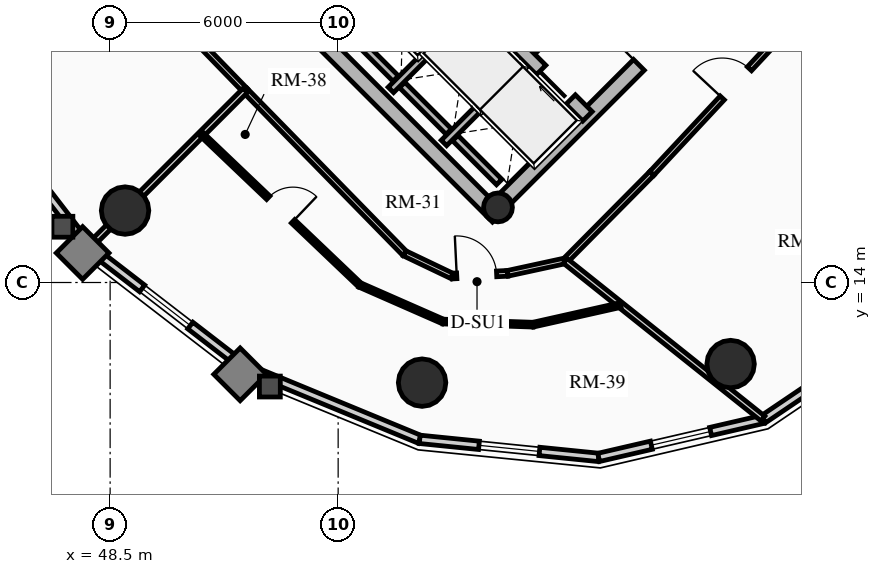
"""IFC4 building model, lengths in metres.
Left out: names, types, materials, properties, quantities, classifications, styles, units other than length and angle.
Written with IfcOpenShell. Run it as: python <this file> out.ifc"""

import sys

from ifc_helpers import new_model, si_unit, direction, frame, frame_2d, origin, origin_2d, place, context, subcontext, project, spatial, rectangle, circle, hollow_circle, extrude, source, transform, mapped, element, fill, save


model = new_model("IFC4")
c1 = context("Model", 3, precision=1e-05, world=origin(), true_north=direction((0.0, 1.0)))
c2 = subcontext(c1, "Body", "Model", "MODEL_VIEW")
j1 = project(units=[si_unit("LENGTHUNIT", "METRE"), si_unit("PLANEANGLEUNIT", "RADIAN")], contexts=[c1])
p1 = place(None, origin())
s1 = spatial("IfcSite", under=j1, at=p1, CompositionType="ELEMENT")
p2 = place(p1, origin())
s2 = spatial("IfcBuilding", under=s1, at=p2, CompositionType="ELEMENT")
p3 = place(p2, frame((0.0, 0.0, 169.06)))
s3 = spatial("IfcBuildingStorey", under=s2, at=p3, CompositionType="ELEMENT", Elevation=169.06)
p4 = place(p3, frame((58.702, 15.732, 0.0), z_axis=(0.0, 0.0, 1.0), x_axis=(-0.707106781187, 0.707106781187, 0.0)))
e1 = element("IfcWall", 1, at=p4, inside=s3, PredefinedType="SHEAR", context=c2, shape_type="SweptSolid", body=[
    extrude(rectangle(XDim=14.1, YDim=0.4, at=frame_2d((7.05, 0.0))), origin(), (0.0, 0.0, 1.0), 2.91),
])
p5 = place(p3, frame((58.561, 15.873, 0.0), z_axis=(0.0, 0.0, 1.0), x_axis=(0.707106781187, 0.707106781187, 0.0)))
e2 = element("IfcWall", 2, at=p5, inside=s3, PredefinedType="SHEAR", context=c2, shape_type="SweptSolid", body=[
    extrude(rectangle(XDim=10.7, YDim=0.4, at=frame_2d((5.35, 0.0))), origin(), (0.0, 0.0, 1.0), 2.91),
])
m1 = source(origin(), c2, "Body", "SweptSolid", [
    extrude(rectangle(XDim=1.5, YDim=2.02, at=frame_2d((0.75, 1.01))), frame((0.0, 0.21, 0.0), z_axis=(0.0, -1.0, 0.0), x_axis=(1.0, 0.0, 0.0)), (0.0, 0.0, 1.0), 0.42),
])
p6 = place(p5, frame((5.45, 0.0, 0.0)))
e3 = element("IfcOpeningElement", 3, at=p6, cuts=e2, PredefinedType="OPENING", context=c2, shape_type="MappedRepresentation", body=[
    mapped(m1, transform((0.0, 0.0, 0.0), x_axis=(1.0, 0.0, 0.0), y_axis=(0.0, 1.0, 0.0), z_axis=(0.0, 0.0, 1.0), scale=1.0)),
])
p7 = place(p3, frame((61.06, 18.373, 0.0), z_axis=(0.0, 0.0, 1.0), x_axis=(-0.707106781187, 0.707106781187, 0.0)))
e4 = element("IfcWall", 4, at=p7, inside=s3, PredefinedType="SHEAR", context=c2, shape_type="SweptSolid", body=[
    extrude(rectangle(XDim=13.7, YDim=0.35, at=frame_2d((6.85, 0.0))), origin(), (0.0, 0.0, 1.0), 2.91),
])
m2 = source(origin(), c2, "Body", "SweptSolid", [
    extrude(rectangle(XDim=1.1, YDim=2.015, at=frame_2d((0.55, 1.007))), frame((0.0, 0.185, 0.0), z_axis=(0.0, -1.0, 0.0), x_axis=(1.0, 0.0, 0.0)), (0.0, 0.0, 1.0), 0.37),
])
p8 = place(p7, frame((4.85, 0.0, 0.0)))
e5 = element("IfcOpeningElement", 5, at=p8, cuts=e4, PredefinedType="OPENING", context=c2, shape_type="MappedRepresentation", body=[
    mapped(m2, transform((0.0, 0.0, 0.0), x_axis=(1.0, 0.0, 0.0), y_axis=(0.0, 1.0, 0.0), z_axis=(0.0, 0.0, 1.0), scale=1.0)),
])
p9 = place(p7, frame((0.625, 0.0, 0.0)))
e6 = element("IfcOpeningElement", 6, at=p9, cuts=e4, PredefinedType="OPENING", context=c2, shape_type="MappedRepresentation", body=[
    mapped(m2, transform((0.0, 0.0, 0.0), x_axis=(1.0, 0.0, 0.0), y_axis=(0.0, 1.0, 0.0), z_axis=(0.0, 0.0, 1.0), scale=1.0)),
])
p10 = place(p7, frame((2.625, 0.0, 0.0)))
e7 = element("IfcOpeningElement", 7, at=p10, cuts=e4, PredefinedType="OPENING", context=c2, shape_type="MappedRepresentation", body=[
    mapped(m2, transform((0.0, 0.0, 0.0), x_axis=(1.0, 0.0, 0.0), y_axis=(0.0, 1.0, 0.0), z_axis=(0.0, 0.0, 1.0), scale=1.0)),
])
m3 = source(origin(), c2, "Body", "SweptSolid", [
    extrude(rectangle(XDim=1.15, YDim=2.02, at=frame_2d((0.575, 1.01))), frame((0.0, 0.185, 0.0), z_axis=(0.0, -1.0, 0.0), x_axis=(1.0, 0.0, 0.0)), (0.0, 0.0, 1.0), 0.37),
])
p11 = place(p7, frame((7.27, 0.0, 0.0)))
e8 = element("IfcOpeningElement", 8, at=p11, cuts=e4, PredefinedType="OPENING", context=c2, shape_type="MappedRepresentation", body=[
    mapped(m3, transform((0.0, 0.0, 0.0), x_axis=(1.0, 0.0, 0.0), y_axis=(0.0, 1.0, 0.0), z_axis=(0.0, 0.0, 1.0), scale=1.0)),
])
p12 = place(p3, frame((58.706, 15.976, 0.0), z_axis=(0.0, 0.0, 1.0), x_axis=(0.707106781187, 0.707106781187, 0.0)))
e9 = element("IfcColumn", 9, at=p12, inside=s3, PredefinedType="COLUMN", context=c2, shape_type="SweptSolid", body=[
    extrude(hollow_circle(Radius=0.38, WallThickness=0.032, at=origin_2d()), origin(), (0.0, 0.0, 1.0), 2.91),
])
for number, where, z_axis, x_axis in (
    (10, (48.893, 15.893, 0.0), (0.0, 0.0, 1.0), (1.0, 0.0, 0.0)),
    (11, (56.709, 11.365, 0.0), (0.0, 0.0, 1.0), (1.0, 0.0, 0.0)),
    (12, (64.827, 11.854, 0.0), (0.0, 0.0, 1.0), (1.0, 0.0, 0.0)),
):
    element("IfcColumn", number, at=place(p3, frame(where, z_axis=z_axis, x_axis=x_axis)), inside=s3, PredefinedType="USERDEFINED", context=c2, shape_type="SweptSolid", body=[
        extrude(circle(Radius=0.625, at=origin_2d()), origin(), (0.0, 0.0, 1.0), 2.91),
    ])
p13 = place(p3, frame((47.932, 14.932, 0.0), z_axis=(0.0, 0.0, 1.0), x_axis=(-0.610569654715, 0.791962560189, 0.0)))
e13 = element("IfcWall", 13, at=p13, inside=s3, PredefinedType="SOLIDWALL", context=c2, shape_type="SweptSolid", body=[
    extrude(rectangle(XDim=5.163, YDim=0.22, at=frame_2d((2.582, 0.0))), origin(), (0.0, 0.0, 1.0), 2.245),
])
p14 = place(p3, frame((52.021, 11.78, 0.0), z_axis=(0.0, 0.0, 1.0), x_axis=(-0.791962560189, 0.610569654715, 0.0)))
e14 = element("IfcWall", 14, at=p14, inside=s3, PredefinedType="SOLIDWALL", context=c2, shape_type="SweptSolid", body=[
    extrude(rectangle(XDim=5.163, YDim=0.22, at=frame_2d((2.582, 0.0))), origin(), (0.0, 0.0, 1.0), 2.245),
])
m4 = source(origin(), c2, "Body", "SweptSolid", [
    extrude(rectangle(XDim=1.6, YDim=1.3, at=frame_2d((0.8, 0.65))), frame((0.0, 0.12, 0.0), z_axis=(0.0, -1.0, 0.0), x_axis=(1.0, 0.0, 0.0)), (0.0, 0.0, 1.0), 0.24),
])
p15 = place(p14, frame((1.782, 0.0, 0.65)))
e15 = element("IfcOpeningElement", 15, at=p15, cuts=e14, PredefinedType="OPENING", context=c2, shape_type="MappedRepresentation", body=[
    mapped(m4, transform((0.0, 0.0, 0.0), x_axis=(1.0, 0.0, 0.0), y_axis=(0.0, 1.0, 0.0), z_axis=(0.0, 0.0, 1.0), scale=1.0)),
])
p16 = place(p3, frame((56.646, 9.873, 0.0), z_axis=(0.0, 0.0, 1.0), x_axis=(-0.924494066201, 0.381196434348, 0.0)))
e16 = element("IfcWall", 16, at=p16, inside=s3, PredefinedType="SOLIDWALL", context=c2, shape_type="SweptSolid", body=[
    extrude(rectangle(XDim=5.003, YDim=0.22, at=frame_2d((2.501, 0.0))), origin(), (0.0, 0.0, 1.0), 2.245),
])
p17 = place(p3, frame((61.355, 9.397, 0.0), z_axis=(0.0, 0.0, 1.0), x_axis=(-0.994943283129, 0.100438356004, 0.0)))
e17 = element("IfcWall", 17, at=p17, inside=s3, PredefinedType="SOLIDWALL", context=c2, shape_type="SweptSolid", body=[
    extrude(rectangle(XDim=4.733, YDim=0.22, at=frame_2d((2.366, 0.0))), origin(), (0.0, 0.0, 1.0), 2.245),
])
p18 = place(p17, frame((1.566, 0.0, 0.65)))
e18 = element("IfcOpeningElement", 18, at=p18, cuts=e17, PredefinedType="OPENING", context=c2, shape_type="MappedRepresentation", body=[
    mapped(m4, transform((0.0, 0.0, 0.0), x_axis=(1.0, 0.0, 0.0), y_axis=(0.0, 1.0, 0.0), z_axis=(0.0, 0.0, 1.0), scale=1.0)),
])
p19 = place(p3, frame((65.687, 10.4, 0.0), z_axis=(0.0, 0.0, 1.0), x_axis=(-0.97422620202, -0.22557328587, 0.0)))
e19 = element("IfcWall", 19, at=p19, inside=s3, PredefinedType="SOLIDWALL", context=c2, shape_type="SweptSolid", body=[
    extrude(rectangle(XDim=4.446, YDim=0.22, at=frame_2d((2.223, 0.0))), origin(), (0.0, 0.0, 1.0), 2.245),
])
p20 = place(p19, frame((1.423, 0.0, 0.65)))
e20 = element("IfcOpeningElement", 20, at=p20, cuts=e19, PredefinedType="OPENING", context=c2, shape_type="MappedRepresentation", body=[
    mapped(m4, transform((0.0, 0.0, 0.0), x_axis=(1.0, 0.0, 0.0), y_axis=(0.0, 1.0, 0.0), z_axis=(0.0, 0.0, 1.0), scale=1.0)),
])
p21 = place(p3, frame((69.217, 12.783, 0.0), z_axis=(0.0, 0.0, 1.0), x_axis=(-0.828817439852, -0.55951912514, 0.0)))
e21 = element("IfcWall", 21, at=p21, inside=s3, PredefinedType="SOLIDWALL", context=c2, shape_type="SweptSolid", body=[
    extrude(rectangle(XDim=4.259, YDim=0.22, at=frame_2d((2.129, 0.0))), origin(), (0.0, 0.0, 1.0), 2.245),
])
p22 = place(p3, frame((55.888, 19.069, 0.0), z_axis=(0.0, 0.0, 1.0), x_axis=(0.707106781187, 0.707106781187, 0.0)))
e22 = element("IfcWall", 22, at=p22, inside=s3, PredefinedType="SHEAR", context=c2, shape_type="SweptSolid", body=[
    extrude(rectangle(XDim=2.97, YDim=0.2, at=frame_2d((1.485, 0.0))), origin(), (0.0, 0.0, 1.0), 2.91),
])
p23 = place(p3, frame((56.015, 19.366, 0.0), z_axis=(0.0, 0.0, 1.0), x_axis=(-0.707106781187, 0.707106781187, 0.0)))
e23 = element("IfcWall", 23, at=p23, inside=s3, PredefinedType="SHEAR", context=c2, shape_type="SweptSolid", body=[
    extrude(rectangle(XDim=2.44, YDim=0.2, at=frame_2d((1.22, 0.0))), origin(), (0.0, 0.0, 1.0), 2.91),
])
p24 = place(p3, frame((57.284, 17.673, 0.0), z_axis=(0.0, 0.0, 1.0), x_axis=(0.707147878904, 0.70706568108, 0.0)))
e24 = element("IfcWall", 24, at=p24, inside=s3, PredefinedType="SHEAR", context=c2, shape_type="SweptSolid", body=[
    extrude(rectangle(XDim=2.97, YDim=0.2, at=frame_2d((1.485, 0.0))), origin(), (0.0, 0.0, 1.0), 2.91),
])
p25 = place(p3, frame((57.412, 17.97, 0.0), z_axis=(0.0, 0.0, 1.0), x_axis=(-0.707106781187, 0.707106781187, 0.0)))
e25 = element("IfcWall", 25, at=p25, inside=s3, PredefinedType="SHEAR", context=c2, shape_type="SweptSolid", body=[
    extrude(rectangle(XDim=1.735, YDim=0.2, at=frame_2d((0.867, 0.0))), origin(), (0.0, 0.0, 1.0), 2.91),
])
p26 = place(p3, frame((58.737, 16.644, 0.0), z_axis=(0.0, 0.0, 1.0), x_axis=(-0.707032117043, 0.707181437447, 0.0)))
e26 = element("IfcWall", 26, at=p26, inside=s3, PredefinedType="SHEAR", context=c2, shape_type="SweptSolid", body=[
    extrude(rectangle(XDim=1.635, YDim=0.2, at=frame_2d((0.817, 0.0))), origin(), (0.0, 0.0, 1.0), 2.91),
])
p27 = place(p3, frame((59.643, 20.066, 0.0), z_axis=(0.0, 0.0, 1.0), x_axis=(0.707106781187, 0.707106781187, 0.0)))
e27 = element("IfcWall", 27, at=p27, inside=s3, PredefinedType="PARTITIONING", context=c2, shape_type="SweptSolid", body=[
    extrude(rectangle(XDim=1.1, YDim=0.125, at=frame_2d((0.55, 0.0))), origin(), (0.0, 0.0, 1.0), 2.675),
])
p28 = place(p3, frame((47.959, 23.277, 0.0), z_axis=(0.0, 0.0, 1.0), x_axis=(0.696422573496, -0.717631938479, 0.0)))
e28 = element("IfcWall", 28, at=p28, inside=s3, PredefinedType="PARTITIONING", context=c2, shape_type="SweptSolid", body=[
    extrude(rectangle(XDim=5.882, YDim=0.15, at=frame_2d((2.941, 0.0))), origin(), (0.0, 0.0, 1.0), 2.675),
])
m5 = source(origin(), c2, "Body", "SweptSolid", [
    extrude(rectangle(XDim=1.0, YDim=2.015, at=frame_2d((0.5, 1.007))), frame((0.0, 0.085, 0.0), z_axis=(0.0, -1.0, 0.0), x_axis=(1.0, 0.0, 0.0)), (0.0, 0.0, 1.0), 0.17),
])
p29 = place(p28, frame((2.441, 0.0, 0.0)))
e29 = element("IfcOpeningElement", 29, at=p29, cuts=e28, PredefinedType="OPENING", context=c2, shape_type="MappedRepresentation", body=[
    mapped(m5, transform((0.0, 0.0, 0.0), x_axis=(1.0, 0.0, 0.0), y_axis=(0.0, 1.0, 0.0), z_axis=(0.0, 0.0, 1.0), scale=1.0)),
])
p30 = place(p3, frame((52.055, 19.055, 0.0), z_axis=(0.0, 0.0, 1.0), x_axis=(0.699249850691, -0.714877364524, 0.0)))
e30 = element("IfcWall", 30, at=p30, inside=s3, PredefinedType="PARTITIONING", context=c2, shape_type="SweptSolid", body=[
    extrude(rectangle(XDim=5.999, YDim=0.15, at=frame_2d((3.0, 0.0))), origin(), (0.0, 0.0, 1.0), 2.245),
])
p31 = place(p3, frame((56.25, 14.767, 0.0), z_axis=(0.0, 0.0, 1.0), x_axis=(0.902518380752, -0.430651335078, 0.0)))
e31 = element("IfcWall", 31, at=p31, inside=s3, PredefinedType="PARTITIONING", context=c2, shape_type="SweptSolid", body=[
    extrude(rectangle(XDim=1.386, YDim=0.15, at=frame_2d((0.693, 0.0))), origin(), (0.0, 0.0, 1.0), 2.245),
])
p32 = place(p3, frame((57.501, 14.17, 0.0), z_axis=(0.0, 0.0, 1.0), x_axis=(0.998814137693, 0.048685915254, 0.0)))
e32 = element("IfcWall", 32, at=p32, inside=s3, PredefinedType="PARTITIONING", context=c2, shape_type="SweptSolid", body=[
    extrude(rectangle(XDim=1.459, YDim=0.15, at=frame_2d((0.729, 0.0))), origin(), (0.0, 0.0, 1.0), 2.245),
])
m6 = source(origin(), c2, "Body", "SweptSolid", [
    extrude(rectangle(XDim=1.05, YDim=2.015, at=frame_2d((0.525, 1.007))), frame((0.0, 0.085, 0.0), z_axis=(0.0, -1.0, 0.0), x_axis=(1.0, 0.0, 0.0)), (0.0, 0.0, 1.0), 0.17),
])
p33 = place(p32, frame((0.12, 0.0, 0.0)))
e33 = element("IfcOpeningElement", 33, at=p33, cuts=e32, PredefinedType="OPENING", context=c2, shape_type="MappedRepresentation", body=[
    mapped(m6, transform((0.0, 0.0, 0.0), x_axis=(1.0, 0.0, 0.0), y_axis=(0.0, 1.0, 0.0), z_axis=(0.0, 0.0, 1.0), scale=1.0)),
])
p34 = place(p3, frame((58.959, 14.241, 0.0), z_axis=(0.0, 0.0, 1.0), x_axis=(0.977216106897, 0.212246744196, 0.0)))
e34 = element("IfcWall", 34, at=p34, inside=s3, PredefinedType="PARTITIONING", context=c2, shape_type="SweptSolid", body=[
    extrude(rectangle(XDim=1.552, YDim=0.15, at=frame_2d((0.776, 0.0))), origin(), (0.0, 0.0, 1.0), 2.245),
])
p35 = place(p3, frame((60.475, 14.57, 0.0), z_axis=(0.0, 0.0, 1.0), x_axis=(0.703709284374, 0.710488031628, 0.0)))
e35 = element("IfcWall", 35, at=p35, inside=s3, PredefinedType="PARTITIONING", context=c2, shape_type="SweptSolid", body=[
    extrude(rectangle(XDim=3.241, YDim=0.15, at=frame_2d((1.621, 0.0))), origin(), (0.0, 0.0, 1.0), 2.245),
])
p36 = place(p3, frame((62.756, 16.873, 0.0), z_axis=(0.0, 0.0, 1.0), x_axis=(0.682136885079, 0.73122450042, 0.0)))
e36 = element("IfcWall", 36, at=p36, inside=s3, PredefinedType="PARTITIONING", context=c2, shape_type="SweptSolid", body=[
    extrude(rectangle(XDim=6.476, YDim=0.15, at=frame_2d((3.238, 0.0))), origin(), (0.0, 0.0, 1.0), 2.245),
])
p37 = place(p36, frame((2.713, 0.0, 0.0)))
e37 = element("IfcOpeningElement", 37, at=p37, cuts=e36, PredefinedType="OPENING", context=c2, shape_type="MappedRepresentation", body=[
    mapped(m6, transform((0.0, 0.0, 0.0), x_axis=(1.0, 0.0, 0.0), y_axis=(0.0, 1.0, 0.0), z_axis=(0.0, 0.0, 1.0), scale=1.0)),
])
p38 = place(p3, frame((52.055, 19.055, 0.0), z_axis=(0.0, 0.0, 1.0), x_axis=(-0.707106781187, -0.707106781187, 0.0)))
e38 = element("IfcWall", 38, at=p38, inside=s3, PredefinedType="PARTITIONING", context=c2, shape_type="SweptSolid", body=[
    extrude(rectangle(XDim=5.811, YDim=0.16, at=frame_2d((2.906, 0.0))), origin(), (0.0, 0.0, 1.0), 2.245),
])
p39 = place(p3, frame((60.475, 14.57, 0.0), z_axis=(0.0, 0.0, 1.0), x_axis=(0.78156967059, -0.623817962241, 0.0)))
e39 = element("IfcWall", 39, at=p39, inside=s3, PredefinedType="PARTITIONING", context=c2, shape_type="SweptSolid", body=[
    extrude(rectangle(XDim=6.656, YDim=0.16, at=frame_2d((3.328, 0.0))), origin(), (0.0, 0.0, 1.0), 2.245),
])
p40 = place(p3, frame((50.905, 17.905, 0.0), z_axis=(0.0, 0.0, 1.0), x_axis=(0.723816902075, -0.689992095803, 0.0)))
e40 = element("IfcWall", 40, at=p40, inside=s3, PredefinedType="PARTITIONING", context=c2, shape_type="SweptSolid", body=[
    extrude(rectangle(XDim=5.753, YDim=0.125, at=frame_2d((2.876, 0.0))), origin(), (0.0, 0.0, 1.0), 2.245),
])
m7 = source(origin(), c2, "Body", "SweptSolid", [
    extrude(rectangle(XDim=0.9, YDim=2.005, at=frame_2d((0.45, 1.002))), frame((0.0, 0.073, 0.0), z_axis=(0.0, -1.0, 0.0), x_axis=(1.0, 0.0, 0.0)), (0.0, 0.0, 1.0), 0.145),
])
p41 = place(p40, frame((2.426, 0.0, 0.0)))
e41 = element("IfcOpeningElement", 41, at=p41, cuts=e40, PredefinedType="OPENING", context=c2, shape_type="MappedRepresentation", body=[
    mapped(m7, transform((0.0, 0.0, 0.0), x_axis=(1.0, 0.0, 0.0), y_axis=(0.0, 1.0, 0.0), z_axis=(0.0, 0.0, 1.0), scale=1.0)),
])
p42 = place(p3, frame((55.069, 13.936, 0.0), z_axis=(0.0, 0.0, 1.0), x_axis=(0.915625735972, -0.402031729626, 0.0)))
e42 = element("IfcWall", 42, at=p42, inside=s3, PredefinedType="PARTITIONING", context=c2, shape_type="SweptSolid", body=[
    extrude(rectangle(XDim=2.396, YDim=0.125, at=frame_2d((1.198, 0.0))), origin(), (0.0, 0.0, 1.0), 2.245),
])
p43 = place(p3, frame((57.263, 12.972, 0.0), z_axis=(0.0, 0.0, 1.0), x_axis=(0.999399614086, -0.034646953192, 0.0)))
e43 = element("IfcWall", 43, at=p43, inside=s3, PredefinedType="PARTITIONING", context=c2, shape_type="SweptSolid", body=[
    extrude(rectangle(XDim=2.368, YDim=0.125, at=frame_2d((1.184, 0.0))), origin(), (0.0, 0.0, 1.0), 2.245),
])
p44 = place(p3, frame((59.629, 12.89, 0.0), z_axis=(0.0, 0.0, 1.0), x_axis=(0.97566344203, 0.219273454585, 0.0)))
e44 = element("IfcWall", 44, at=p44, inside=s3, PredefinedType="PARTITIONING", context=c2, shape_type="SweptSolid", body=[
    extrude(rectangle(XDim=2.36, YDim=0.125, at=frame_2d((1.18, 0.0))), origin(), (0.0, 0.0, 1.0), 2.245),
])
m8 = source(origin(), c2, "Body", "SweptSolid", [
    extrude(rectangle(XDim=1.6, YDim=1.3, at=frame_2d((0.8, 0.65))), frame((0.0, 0.03, 0.0), z_axis=(0.0, -1.0, 0.0), x_axis=(1.0, 0.0, 0.0)), (0.0, 0.0, 1.0), 0.06),
])
p45 = place(p15, origin())
e45 = element("IfcWindow", 45, at=p45, inside=s3, PartitioningType="SINGLE_PANEL", PredefinedType="WINDOW", context=c2, shape_type="MappedRepresentation", body=[
    mapped(m8, transform((0.0, 0.0, 0.0), x_axis=(1.0, 0.0, 0.0), y_axis=(0.0, 1.0, 0.0), z_axis=(0.0, 0.0, 1.0), scale=1.0)),
])
fill(e15, e45)
p46 = place(p18, origin())
e46 = element("IfcWindow", 46, at=p46, inside=s3, PartitioningType="SINGLE_PANEL", PredefinedType="WINDOW", context=c2, shape_type="MappedRepresentation", body=[
    mapped(m8, transform((0.0, 0.0, 0.0), x_axis=(1.0, 0.0, 0.0), y_axis=(0.0, 1.0, 0.0), z_axis=(0.0, 0.0, 1.0), scale=1.0)),
])
fill(e18, e46)
p47 = place(p20, origin())
e47 = element("IfcWindow", 47, at=p47, inside=s3, PartitioningType="SINGLE_PANEL", PredefinedType="WINDOW", context=c2, shape_type="MappedRepresentation", body=[
    mapped(m8, transform((0.0, 0.0, 0.0), x_axis=(1.0, 0.0, 0.0), y_axis=(0.0, 1.0, 0.0), z_axis=(0.0, 0.0, 1.0), scale=1.0)),
])
fill(e20, e47)
m9 = source(origin(), c2, "Body", "SweptSolid", [
    extrude(rectangle(XDim=1.1, YDim=2.015, at=frame_2d((0.55, 1.007))), frame((0.0, 0.025, 0.0), z_axis=(0.0, -1.0, 0.0), x_axis=(1.0, 0.0, 0.0)), (0.0, 0.0, 1.0), 0.05),
])
p48 = place(p9, origin())
e48 = element("IfcDoor", 48, at=p48, inside=s3, OperationType="SLIDING_TO_RIGHT", PredefinedType="DOOR", context=c2, shape_type="MappedRepresentation", body=[
    mapped(m9, transform((0.0, 0.0, 0.0), x_axis=(1.0, 0.0, 0.0), y_axis=(0.0, 1.0, 0.0), z_axis=(0.0, 0.0, 1.0), scale=1.0)),
])
fill(e6, e48)
m10 = source(origin(), c2, "Body", "SweptSolid", [
    extrude(rectangle(XDim=1.5, YDim=2.02, at=frame_2d((0.75, 1.01))), frame((0.0, 0.025, 0.0), z_axis=(0.0, -1.0, 0.0), x_axis=(1.0, 0.0, 0.0)), (0.0, 0.0, 1.0), 0.05),
])
p49 = place(p6, origin())
e49 = element("IfcDoor", 49, at=p49, inside=s3, OperationType="DOUBLE_DOOR_SINGLE_SWING", PredefinedType="DOOR", context=c2, shape_type="MappedRepresentation", body=[
    mapped(m10, transform((0.0, 0.0, 0.0), x_axis=(1.0, 0.0, 0.0), y_axis=(0.0, 1.0, 0.0), z_axis=(0.0, 0.0, 1.0), scale=1.0)),
])
fill(e3, e49)
m11 = source(origin(), c2, "Body", "SweptSolid", [
    extrude(rectangle(XDim=1.05, YDim=2.015, at=frame_2d((0.525, 1.007))), frame((0.0, 0.025, 0.0), z_axis=(0.0, -1.0, 0.0), x_axis=(1.0, 0.0, 0.0)), (0.0, 0.0, 1.0), 0.05),
])
p50 = place(p33, origin())
e50 = element("IfcDoor", 50, at=p50, inside=s3, OperationType="SINGLE_SWING_LEFT", PredefinedType="DOOR", context=c2, shape_type="MappedRepresentation", body=[
    mapped(m11, transform((0.0, 0.0, 0.0), x_axis=(1.0, 0.0, 0.0), y_axis=(0.0, 1.0, 0.0), z_axis=(0.0, 0.0, 1.0), scale=1.0)),
])
fill(e33, e50)
m12 = source(origin(), c2, "Body", "SweptSolid", [
    extrude(rectangle(XDim=0.9, YDim=2.005, at=frame_2d((0.45, 1.002))), frame((0.0, 0.025, 0.0), z_axis=(0.0, -1.0, 0.0), x_axis=(1.0, 0.0, 0.0)), (0.0, 0.0, 1.0), 0.05),
])
p51 = place(p41, origin())
e51 = element("IfcDoor", 51, at=p51, inside=s3, OperationType="SINGLE_SWING_RIGHT", PredefinedType="DOOR", context=c2, shape_type="MappedRepresentation", body=[
    mapped(m12, transform((0.0, 0.0, 0.0), x_axis=(1.0, 0.0, 0.0), y_axis=(0.0, 1.0, 0.0), z_axis=(0.0, 0.0, 1.0), scale=1.0)),
])
fill(e41, e51)
p52 = place(p37, origin())
e52 = element("IfcDoor", 52, at=p52, inside=s3, OperationType="SINGLE_SWING_LEFT", PredefinedType="DOOR", context=c2, shape_type="MappedRepresentation", body=[
    mapped(m11, transform((0.0, 0.0, 0.0), x_axis=(1.0, 0.0, 0.0), y_axis=(0.0, 1.0, 0.0), z_axis=(0.0, 0.0, 1.0), scale=1.0)),
])
fill(e37, e52)
save(model, sys.argv[1])
